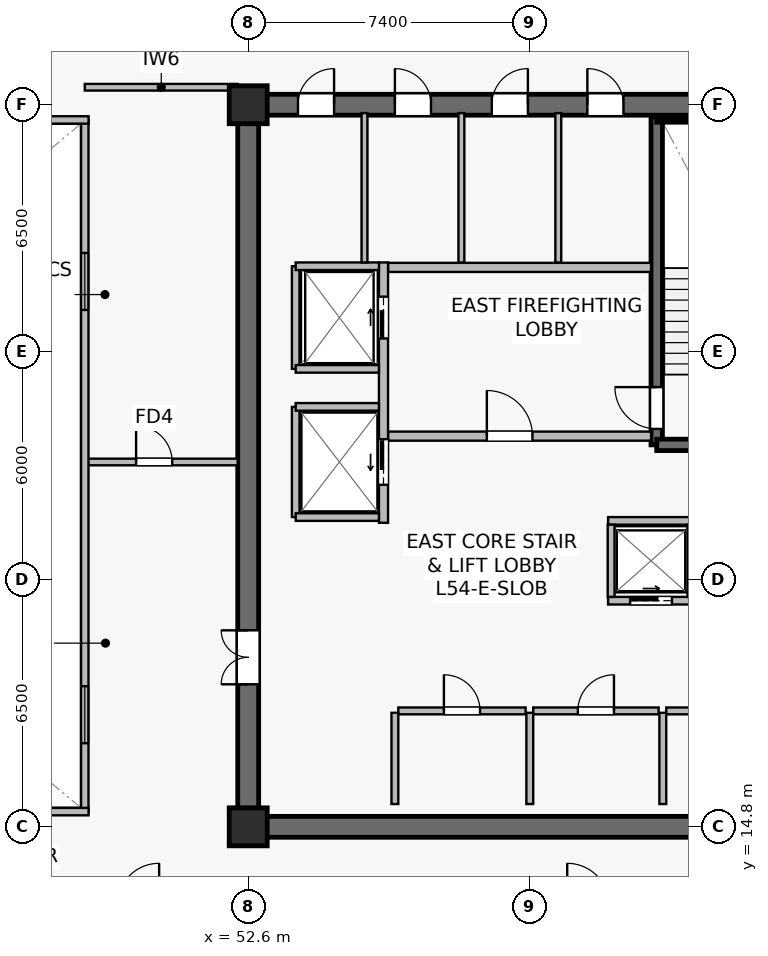
"""IFC4 building model, lengths in metres.
Left out: names, types, materials, properties, quantities, classifications, styles, units other than length and angle.
Written with IfcOpenShell. Run it as: python <this file> out.ifc"""

import sys

from ifc_helpers import new_model, si_unit, direction, frame, frame_2d, origin, origin_2d, place, context, subcontext, project, spatial, rectangle, extrude, source, transform, mapped, element, fill, save


model = new_model("IFC4")
c1 = context("Model", 3, precision=1e-05, world=origin(), true_north=direction((0.0, 1.0)))
c2 = subcontext(c1, "Body", "Model", "MODEL_VIEW")
j1 = project(units=[si_unit("LENGTHUNIT", "METRE"), si_unit("PLANEANGLEUNIT", "RADIAN")], contexts=[c1])
p1 = place(None, origin())
s1 = spatial("IfcSite", under=j1, at=p1, CompositionType="ELEMENT")
p2 = place(p1, origin())
s2 = spatial("IfcBuilding", under=s1, at=p2, CompositionType="ELEMENT")
p3 = place(p2, frame((0.0, 0.0, 226.0)))
s3 = spatial("IfcBuildingStorey", under=s2, at=p3, CompositionType="ELEMENT", Elevation=226.0)
p4 = place(p3, frame((52.325, 14.8, 0.0), z_axis=(0.0, 0.0, 1.0), x_axis=(1.0, 0.0, 0.0)))
e1 = element("IfcWall", 1, at=p4, inside=s3, PredefinedType="SHEAR", context=c2, shape_type="SweptSolid", body=[
    extrude(rectangle(XDim=15.35, YDim=0.55, at=frame_2d((7.675, 0.0))), origin(), (0.0, 0.0, 1.0), 3.8),
])
p5 = place(p3, frame((52.325, 33.8, 0.0), z_axis=(0.0, 0.0, 1.0), x_axis=(1.0, 0.0, 0.0)))
e2 = element("IfcWall", 2, at=p5, inside=s3, PredefinedType="SHEAR", context=c2, shape_type="SweptSolid", body=[
    extrude(rectangle(XDim=15.35, YDim=0.55, at=frame_2d((7.675, 0.0))), origin(), (0.0, 0.0, 1.0), 3.8),
])
p6 = place(p5, frame((9.2, 0.0, 0.0)))
e3 = element("IfcOpeningElement", 3, at=p6, cuts=e2, PredefinedType="OPENING", context=c2, shape_type="SweptSolid", body=[
    extrude(rectangle(XDim=0.95, YDim=2.15, at=frame_2d((0.475, 1.075))), frame((0.0, 0.285, 0.0), z_axis=(0.0, -1.0, 0.0), x_axis=(1.0, 0.0, 0.0)), (0.0, 0.0, 1.0), 0.57),
])
p7 = place(p5, frame((6.685, 0.0, 0.0)))
e4 = element("IfcOpeningElement", 4, at=p7, cuts=e2, PredefinedType="OPENING", context=c2, shape_type="SweptSolid", body=[
    extrude(rectangle(XDim=0.95, YDim=2.15, at=frame_2d((0.475, 1.075))), frame((0.0, 0.285, 0.0), z_axis=(0.0, -1.0, 0.0), x_axis=(1.0, 0.0, 0.0)), (0.0, 0.0, 1.0), 0.57),
])
p8 = place(p5, frame((4.135, 0.0, 0.0)))
e5 = element("IfcOpeningElement", 5, at=p8, cuts=e2, PredefinedType="OPENING", context=c2, shape_type="SweptSolid", body=[
    extrude(rectangle(XDim=0.95, YDim=2.15, at=frame_2d((0.475, 1.075))), frame((0.0, 0.285, 0.0), z_axis=(0.0, -1.0, 0.0), x_axis=(1.0, 0.0, 0.0)), (0.0, 0.0, 1.0), 0.57),
])
p9 = place(p5, frame((1.585, 0.0, 0.0)))
e6 = element("IfcOpeningElement", 6, at=p9, cuts=e2, PredefinedType="OPENING", context=c2, shape_type="SweptSolid", body=[
    extrude(rectangle(XDim=0.95, YDim=2.15, at=frame_2d((0.475, 1.075))), frame((0.0, 0.285, 0.0), z_axis=(0.0, -1.0, 0.0), x_axis=(1.0, 0.0, 0.0)), (0.0, 0.0, 1.0), 0.57),
])
p10 = place(p3, frame((52.6, 15.075, 0.0), z_axis=(0.0, 0.0, 1.0), x_axis=(0.0, 1.0, 0.0)))
e7 = element("IfcWall", 7, at=p10, inside=s3, PredefinedType="SHEAR", context=c2, shape_type="SweptSolid", body=[
    extrude(rectangle(XDim=18.45, YDim=0.55, at=frame_2d((9.225, 0.0))), origin(), (0.0, 0.0, 1.0), 3.8),
])
p11 = place(p10, frame((3.475, 0.0, 0.0)))
e8 = element("IfcOpeningElement", 8, at=p11, cuts=e7, PredefinedType="OPENING", context=c2, shape_type="SweptSolid", body=[
    extrude(rectangle(XDim=1.42, YDim=2.2, at=frame_2d((0.71, 1.1))), frame((0.0, 0.285, 0.0), z_axis=(0.0, -1.0, 0.0), x_axis=(1.0, 0.0, 0.0)), (0.0, 0.0, 1.0), 0.57),
])
p12 = place(p3, frame((63.35, 24.85, 0.0), z_axis=(0.0, 0.0, 1.0), x_axis=(0.0, 1.0, 0.0)))
e9 = element("IfcWall", 9, at=p12, inside=s3, PredefinedType="SHEAR", context=c2, shape_type="SweptSolid", body=[
    extrude(rectangle(XDim=8.63, YDim=0.3, at=frame_2d((4.315, 0.0))), origin(), (0.0, 0.0, 1.0), 3.8),
])
p13 = place(p12, frame((0.42, 0.0, 0.0)))
e10 = element("IfcOpeningElement", 10, at=p13, cuts=e9, PredefinedType="OPENING", context=c2, shape_type="SweptSolid", body=[
    extrude(rectangle(XDim=1.1, YDim=2.15, at=frame_2d((0.55, 1.075))), frame((0.0, 0.16, 0.0), z_axis=(0.0, -1.0, 0.0), x_axis=(1.0, 0.0, 0.0)), (0.0, 0.0, 1.0), 0.32),
])
p14 = place(p3, frame((63.35, 24.85, 0.0), z_axis=(0.0, 0.0, 1.0), x_axis=(1.0, 0.0, 0.0)))
e11 = element("IfcWall", 11, at=p14, inside=s3, PredefinedType="SHEAR", context=c2, shape_type="SweptSolid", body=[
    extrude(rectangle(XDim=3.8, YDim=0.3, at=frame_2d((1.9, 0.0))), origin(), (0.0, 0.0, 1.0), 3.8),
])
p15 = place(p3, frame((63.35, 33.4, 0.0), z_axis=(0.0, 0.0, 1.0), x_axis=(1.0, 0.0, 0.0)))
e12 = element("IfcWall", 12, at=p15, inside=s3, PredefinedType="SOLIDWALL", context=c2, shape_type="SweptSolid", body=[
    extrude(rectangle(XDim=3.72, YDim=0.12, at=frame_2d((1.86, 0.0))), origin(), (0.0, 0.0, 1.0), 3.8),
])
m1 = source(origin(), c2, "Body", "SweptSolid", [
    extrude(rectangle(XDim=1.0, YDim=1.0, at=origin_2d()), origin(), (0.0, 0.0, 1.0), 4.1),
])
for number, where, z_axis, x_axis in (
    (13, (52.6, 14.8, 0.0), (0.0, 0.0, 1.0), (1.0, 0.0, 0.0)),
    (14, (52.6, 33.8, 0.0), (0.0, 0.0, 1.0), (1.0, 0.0, 0.0)),
):
    element("IfcColumn", number, at=place(p3, frame(where, z_axis=z_axis, x_axis=x_axis)), inside=s3, PredefinedType="COLUMN", context=c2, shape_type="MappedRepresentation", body=[
        mapped(m1, transform((0.0, 0.0, 0.0), scale=1.0)),
    ])
p16 = place(p3, frame((56.28, 25.08, 0.0), z_axis=(0.0, 0.0, 1.0), x_axis=(1.0, 0.0, 0.0)))
e15 = element("IfcWall", 15, at=p16, inside=s3, PredefinedType="SOLIDWALL", context=c2, shape_type="SweptSolid", body=[
    extrude(rectangle(XDim=6.92, YDim=0.24, at=frame_2d((3.46, 0.0))), origin(), (0.0, 0.0, 1.0), 3.197),
])
p17 = place(p16, frame((2.6, 0.0, 0.0)))
e16 = element("IfcOpeningElement", 16, at=p17, cuts=e15, PredefinedType="OPENING", context=c2, shape_type="SweptSolid", body=[
    extrude(rectangle(XDim=1.2, YDim=2.16, at=frame_2d((0.6, 1.08))), frame((0.0, 0.13, 0.0), z_axis=(0.0, -1.0, 0.0), x_axis=(1.0, 0.0, 0.0)), (0.0, 0.0, 1.0), 0.26),
])
p18 = place(p3, frame((56.28, 29.52, 0.0), z_axis=(0.0, 0.0, 1.0), x_axis=(1.0, 0.0, 0.0)))
e17 = element("IfcWall", 17, at=p18, inside=s3, PredefinedType="SOLIDWALL", context=c2, shape_type="SweptSolid", body=[
    extrude(rectangle(XDim=6.92, YDim=0.24, at=frame_2d((3.46, 0.0))), origin(), (0.0, 0.0, 1.0), 3.197),
])
p19 = place(p3, frame((56.16, 22.8, 0.0), z_axis=(0.0, 0.0, 1.0), x_axis=(0.0, 1.0, 0.0)))
e18 = element("IfcWall", 18, at=p19, inside=s3, PredefinedType="SOLIDWALL", context=c2, shape_type="SweptSolid", body=[
    extrude(rectangle(XDim=6.85, YDim=0.24, at=frame_2d((3.425, 0.0))), origin(), (0.0, 0.0, 1.0), 2.935),
])
p20 = place(p19, frame((4.85, 0.0, 0.0)))
e19 = element("IfcOpeningElement", 19, at=p20, cuts=e18, PredefinedType="OPENING", context=c2, shape_type="SweptSolid", body=[
    extrude(rectangle(XDim=1.1, YDim=2.22, at=frame_2d((0.55, 1.11))), frame((0.0, 0.13, 0.0), z_axis=(0.0, -1.0, 0.0), x_axis=(1.0, 0.0, 0.0)), (0.0, 0.0, 1.0), 0.26),
])
p21 = place(p19, frame((1.0, 0.0, 0.0)))
e20 = element("IfcOpeningElement", 20, at=p21, cuts=e18, PredefinedType="OPENING", context=c2, shape_type="SweptSolid", body=[
    extrude(rectangle(XDim=1.2, YDim=2.22, at=frame_2d((0.6, 1.11))), frame((0.0, 0.13, 0.0), z_axis=(0.0, -1.0, 0.0), x_axis=(1.0, 0.0, 0.0)), (0.0, 0.0, 1.0), 0.26),
])
p22 = place(p3, frame((62.07, 20.75, 0.0), z_axis=(0.0, 0.0, 1.0), x_axis=(1.0, 0.0, 0.0)))
e21 = element("IfcWall", 21, at=p22, inside=s3, PredefinedType="SOLIDWALL", context=c2, shape_type="SweptSolid", body=[
    extrude(rectangle(XDim=2.26, YDim=0.2, at=frame_2d((1.13, 0.0))), origin(), (0.0, 0.0, 1.0), 3.8),
])
p23 = place(p22, frame((0.58, 0.0, 0.0)))
e22 = element("IfcOpeningElement", 22, at=p23, cuts=e21, PredefinedType="OPENING", context=c2, shape_type="SweptSolid", body=[
    extrude(rectangle(XDim=1.1, YDim=2.22, at=frame_2d((0.55, 1.11))), frame((0.0, 0.11, 0.0), z_axis=(0.0, -1.0, 0.0), x_axis=(1.0, 0.0, 0.0)), (0.0, 0.0, 1.0), 0.22),
])
p24 = place(p3, frame((62.07, 22.85, 0.0), z_axis=(0.0, 0.0, 1.0), x_axis=(1.0, 0.0, 0.0)))
e23 = element("IfcWall", 23, at=p24, inside=s3, PredefinedType="SOLIDWALL", context=c2, shape_type="SweptSolid", body=[
    extrude(rectangle(XDim=2.26, YDim=0.2, at=frame_2d((1.13, 0.0))), origin(), (0.0, 0.0, 1.0), 3.8),
])
for number, where, z_axis, x_axis in (
    (24, (62.15, 20.85, 0.0), (0.0, 0.0, 1.0), (0.0, 1.0, 0.0)),
    (25, (64.25, 20.85, 0.0), (0.0, 0.0, 1.0), (0.0, 1.0, 0.0)),
):
    element("IfcWall", number, at=place(p3, frame(where, z_axis=z_axis, x_axis=x_axis)), inside=s3, PredefinedType="SOLIDWALL", context=c2, shape_type="SweptSolid", body=[
        extrude(rectangle(XDim=1.9, YDim=0.18, at=frame_2d((0.95, 0.0))), origin(), (0.0, 0.0, 1.0), 3.8),
    ])
p25 = place(p3, frame((53.85, 26.85, 0.0), z_axis=(0.0, 0.0, 1.0), x_axis=(0.0, 1.0, 0.0)))
e26 = element("IfcWall", 26, at=p25, inside=s3, PredefinedType="SOLIDWALL", context=c2, shape_type="SweptSolid", body=[
    extrude(rectangle(XDim=2.7, YDim=0.2, at=frame_2d((1.35, 0.0))), origin(), (0.0, 0.0, 1.0), 3.8),
])
p26 = place(p3, frame((53.85, 29.55, 0.0), z_axis=(0.0, 0.0, 1.0), x_axis=(1.0, 0.0, 0.0)))
e27 = element("IfcWall", 27, at=p26, inside=s3, PredefinedType="SOLIDWALL", context=c2, shape_type="SweptSolid", body=[
    extrude(rectangle(XDim=2.19, YDim=0.2, at=frame_2d((1.095, 0.0))), origin(), (0.0, 0.0, 1.0), 3.8),
])
p27 = place(p3, frame((53.85, 26.85, 0.0), z_axis=(0.0, 0.0, 1.0), x_axis=(1.0, 0.0, 0.0)))
e28 = element("IfcWall", 28, at=p27, inside=s3, PredefinedType="SOLIDWALL", context=c2, shape_type="SweptSolid", body=[
    extrude(rectangle(XDim=2.19, YDim=0.2, at=frame_2d((1.095, 0.0))), origin(), (0.0, 0.0, 1.0), 3.197),
])
p28 = place(p3, frame((53.85, 22.95, 0.0), z_axis=(0.0, 0.0, 1.0), x_axis=(0.0, 1.0, 0.0)))
e29 = element("IfcWall", 29, at=p28, inside=s3, PredefinedType="SOLIDWALL", context=c2, shape_type="SweptSolid", body=[
    extrude(rectangle(XDim=2.9, YDim=0.2, at=frame_2d((1.45, 0.0))), origin(), (0.0, 0.0, 1.0), 2.935),
])
for number, where, z_axis, x_axis in (
    (30, (53.85, 25.85, 0.0), (0.0, 0.0, 1.0), (1.0, 0.0, 0.0)),
    (31, (53.85, 22.95, 0.0), (0.0, 0.0, 1.0), (1.0, 0.0, 0.0)),
):
    element("IfcWall", number, at=place(p3, frame(where, z_axis=z_axis, x_axis=x_axis)), inside=s3, PredefinedType="SOLIDWALL", context=c2, shape_type="SweptSolid", body=[
        extrude(rectangle(XDim=2.19, YDim=0.2, at=frame_2d((1.095, 0.0))), origin(), (0.0, 0.0, 1.0), 3.8),
    ])
p29 = place(p3, frame((63.6, 17.85, 0.0), z_axis=(0.0, 0.0, 1.0), x_axis=(1.0, 0.0, 0.0)))
e32 = element("IfcWall", 32, at=p29, inside=s3, PredefinedType="SOLIDWALL", context=c2, shape_type="SweptSolid", body=[
    extrude(rectangle(XDim=3.25, YDim=0.18, at=frame_2d((1.625, 0.0))), origin(), (0.0, 0.0, 1.0), 3.8),
])
p30 = place(p29, frame((1.15, 0.0, 0.0)))
e33 = element("IfcOpeningElement", 33, at=p30, cuts=e32, PredefinedType="OPENING", context=c2, shape_type="SweptSolid", body=[
    extrude(rectangle(XDim=0.95, YDim=2.15, at=frame_2d((0.475, 1.075))), frame((0.0, 0.1, 0.0), z_axis=(0.0, -1.0, 0.0), x_axis=(1.0, 0.0, 0.0)), (0.0, 0.0, 1.0), 0.2),
])
p31 = place(p3, frame((63.51, 15.4, 0.0), z_axis=(0.0, 0.0, 1.0), x_axis=(0.0, 1.0, 0.0)))
e34 = element("IfcWall", 34, at=p31, inside=s3, PredefinedType="SOLIDWALL", context=c2, shape_type="SweptSolid", body=[
    extrude(rectangle(XDim=2.4, YDim=0.18, at=frame_2d((1.2, 0.0))), origin(), (0.0, 0.0, 1.0), 3.8),
])
p32 = place(p3, frame((60.1, 17.85, 0.0), z_axis=(0.0, 0.0, 1.0), x_axis=(1.0, 0.0, 0.0)))
e35 = element("IfcWall", 35, at=p32, inside=s3, PredefinedType="SOLIDWALL", context=c2, shape_type="SweptSolid", body=[
    extrude(rectangle(XDim=3.3, YDim=0.18, at=frame_2d((1.65, 0.0))), origin(), (0.0, 0.0, 1.0), 3.197),
])
p33 = place(p32, frame((1.175, 0.0, 0.0)))
e36 = element("IfcOpeningElement", 36, at=p33, cuts=e35, PredefinedType="OPENING", context=c2, shape_type="SweptSolid", body=[
    extrude(rectangle(XDim=0.95, YDim=2.15, at=frame_2d((0.475, 1.075))), frame((0.0, 0.1, 0.0), z_axis=(0.0, -1.0, 0.0), x_axis=(1.0, 0.0, 0.0)), (0.0, 0.0, 1.0), 0.2),
])
p34 = place(p3, frame((60.01, 15.4, 0.0), z_axis=(0.0, 0.0, 1.0), x_axis=(0.0, 1.0, 0.0)))
e37 = element("IfcWall", 37, at=p34, inside=s3, PredefinedType="SOLIDWALL", context=c2, shape_type="SweptSolid", body=[
    extrude(rectangle(XDim=2.4, YDim=0.18, at=frame_2d((1.2, 0.0))), origin(), (0.0, 0.0, 1.0), 3.197),
])
p35 = place(p3, frame((56.55, 17.85, 0.0), z_axis=(0.0, 0.0, 1.0), x_axis=(1.0, 0.0, 0.0)))
e38 = element("IfcWall", 38, at=p35, inside=s3, PredefinedType="SOLIDWALL", context=c2, shape_type="SweptSolid", body=[
    extrude(rectangle(XDim=3.35, YDim=0.18, at=frame_2d((1.675, 0.0))), origin(), (0.0, 0.0, 1.0), 3.197),
])
p36 = place(p35, frame((1.2, 0.0, 0.0)))
e39 = element("IfcOpeningElement", 39, at=p36, cuts=e38, PredefinedType="OPENING", context=c2, shape_type="SweptSolid", body=[
    extrude(rectangle(XDim=0.95, YDim=2.15, at=frame_2d((0.475, 1.075))), frame((0.0, 0.1, 0.0), z_axis=(0.0, -1.0, 0.0), x_axis=(1.0, 0.0, 0.0)), (0.0, 0.0, 1.0), 0.2),
])
p37 = place(p3, frame((56.46, 15.4, 0.0), z_axis=(0.0, 0.0, 1.0), x_axis=(0.0, 1.0, 0.0)))
e40 = element("IfcWall", 40, at=p37, inside=s3, PredefinedType="SOLIDWALL", context=c2, shape_type="SweptSolid", body=[
    extrude(rectangle(XDim=2.4, YDim=0.18, at=frame_2d((1.2, 0.0))), origin(), (0.0, 0.0, 1.0), 3.8),
])
for number, where, z_axis, x_axis in (
    (41, (60.76, 29.65, 0.0), (0.0, 0.0, 1.0), (0.0, 1.0, 0.0)),
    (42, (58.21, 29.65, 0.0), (0.0, 0.0, 1.0), (0.0, 1.0, 0.0)),
    (43, (55.66, 29.65, 0.0), (0.0, 0.0, 1.0), (0.0, 1.0, 0.0)),
):
    element("IfcWall", number, at=place(p3, frame(where, z_axis=z_axis, x_axis=x_axis)), inside=s3, PredefinedType="PLUMBINGWALL", context=c2, shape_type="SweptSolid", body=[
        extrude(rectangle(XDim=3.93, YDim=0.155, at=frame_2d((1.965, 0.0))), origin(), (0.0, 0.0, 1.0), 3.8),
    ])
p38 = place(p3, frame((48.3, 34.26, 0.0), z_axis=(0.0, 0.0, 1.0), x_axis=(1.0, 0.0, 0.0)))
e44 = element("IfcWall", 44, at=p38, inside=s3, PredefinedType="PARTITIONING", context=c2, shape_type="SweptSolid", body=[
    extrude(rectangle(XDim=4.025, YDim=0.175, at=frame_2d((2.012, 0.0))), origin(), (0.0, 0.0, 1.0), 3.485),
])
p39 = place(p3, frame((48.3, 24.4, 0.0), z_axis=(0.0, 0.0, 1.0), x_axis=(1.0, 0.0, 0.0)))
e45 = element("IfcWall", 45, at=p39, inside=s3, PredefinedType="PARTITIONING", context=c2, shape_type="SweptSolid", body=[
    extrude(rectangle(XDim=4.025, YDim=0.175, at=frame_2d((2.012, 0.0))), origin(), (0.0, 0.0, 1.0), 3.8),
])
p40 = place(p39, frame((1.35, 0.0, 0.0)))
e46 = element("IfcOpeningElement", 46, at=p40, cuts=e45, PredefinedType="OPENING", context=c2, shape_type="SweptSolid", body=[
    extrude(rectangle(XDim=0.95, YDim=2.15, at=frame_2d((0.475, 1.075))), frame((0.0, 0.098, 0.0), z_axis=(0.0, -1.0, 0.0), x_axis=(1.0, 0.0, 0.0)), (0.0, 0.0, 1.0), 0.195),
])
p41 = place(p3, frame((48.3, 15.2, 0.0), z_axis=(0.0, 0.0, 1.0), x_axis=(0.0, 1.0, 0.0)))
e47 = element("IfcWall", 47, at=p41, inside=s3, PredefinedType="SOLIDWALL", context=c2, shape_type="SweptSolid", body=[
    extrude(rectangle(XDim=18.2, YDim=0.195, at=frame_2d((9.1, 0.0))), origin(), (0.0, 0.0, 1.0), 3.8),
])
p42 = place(p41, frame((1.8, 0.0, 0.9)))
e48 = element("IfcOpeningElement", 48, at=p42, cuts=e47, PredefinedType="OPENING", context=c2, shape_type="SweptSolid", body=[
    extrude(rectangle(XDim=1.5, YDim=1.4, at=frame_2d((0.75, 0.7))), frame((0.0, 0.107, 0.0), z_axis=(0.0, -1.0, 0.0), x_axis=(1.0, 0.0, 0.0)), (0.0, 0.0, 1.0), 0.215),
])
p43 = place(p41, frame((13.2, 0.0, 0.9)))
e49 = element("IfcOpeningElement", 49, at=p43, cuts=e47, PredefinedType="OPENING", context=c2, shape_type="SweptSolid", body=[
    extrude(rectangle(XDim=1.5, YDim=1.4, at=frame_2d((0.75, 0.7))), frame((0.0, 0.107, 0.0), z_axis=(0.0, -1.0, 0.0), x_axis=(1.0, 0.0, 0.0)), (0.0, 0.0, 1.0), 0.215),
])
for number, where, z_axis, x_axis in (
    (50, (26.4, 15.2, 0.0), (0.0, 0.0, 1.0), (1.0, 0.0, 0.0)),
    (51, (26.4, 33.4, 0.0), (0.0, 0.0, 1.0), (1.0, 0.0, 0.0)),
):
    element("IfcWall", number, at=place(p3, frame(where, z_axis=z_axis, x_axis=x_axis)), inside=s3, PredefinedType="SOLIDWALL", context=c2, shape_type="SweptSolid", body=[
        extrude(rectangle(XDim=22.0, YDim=0.195, at=frame_2d((11.0, 0.0))), origin(), (0.0, 0.0, 1.0), 3.8),
    ])
m2 = source(origin(), c2, "Body", "SweptSolid", [
    extrude(rectangle(XDim=1.5, YDim=1.4, at=frame_2d((0.75, 0.7))), frame((0.0, 0.03, 0.0), z_axis=(0.0, -1.0, 0.0), x_axis=(1.0, 0.0, 0.0)), (0.0, 0.0, 1.0), 0.06),
])
p44 = place(p42, origin())
e52 = element("IfcWindow", 52, at=p44, inside=s3, PartitioningType="SINGLE_PANEL", PredefinedType="WINDOW", context=c2, shape_type="MappedRepresentation", body=[
    mapped(m2, transform((0.0, 0.0, 0.0), scale=1.0)),
])
fill(e48, e52)
p45 = place(p43, origin())
e53 = element("IfcWindow", 53, at=p45, inside=s3, PartitioningType="SINGLE_PANEL", PredefinedType="WINDOW", context=c2, shape_type="MappedRepresentation", body=[
    mapped(m2, transform((0.0, 0.0, 0.0), scale=1.0)),
])
fill(e49, e53)
m3 = source(origin(), c2, "Body", "SweptSolid", [
    extrude(rectangle(XDim=1.1, YDim=2.15, at=frame_2d((0.55, 1.075))), frame((0.0, 0.025, 0.0), z_axis=(0.0, -1.0, 0.0), x_axis=(1.0, 0.0, 0.0)), (0.0, 0.0, 1.0), 0.05),
])
p46 = place(p13, origin())
e54 = element("IfcDoor", 54, at=p46, inside=s3, OperationType="SINGLE_SWING_RIGHT", PredefinedType="DOOR", context=c2, shape_type="MappedRepresentation", body=[
    mapped(m3, transform((0.0, 0.0, 0.0), scale=1.0)),
])
fill(e10, e54)
m4 = source(origin(), c2, "Body", "SweptSolid", [
    extrude(rectangle(XDim=1.2, YDim=2.16, at=frame_2d((0.6, 1.08))), frame((0.0, 0.025, 0.0), z_axis=(0.0, -1.0, 0.0), x_axis=(1.0, 0.0, 0.0)), (0.0, 0.0, 1.0), 0.05),
])
p47 = place(p17, origin())
e55 = element("IfcDoor", 55, at=p47, inside=s3, OperationType="SINGLE_SWING_LEFT", PredefinedType="DOOR", context=c2, shape_type="MappedRepresentation", body=[
    mapped(m4, transform((0.0, 0.0, 0.0), scale=1.0)),
])
fill(e16, e55)
m5 = source(origin(), c2, "Body", "SweptSolid", [
    extrude(rectangle(XDim=1.1, YDim=2.22, at=frame_2d((0.55, 1.11))), frame((0.0, 0.025, 0.0), z_axis=(0.0, -1.0, 0.0), x_axis=(1.0, 0.0, 0.0)), (0.0, 0.0, 1.0), 0.05),
])
p48 = place(p23, origin())
e56 = element("IfcDoor", 56, at=p48, inside=s3, OperationType="SLIDING_TO_RIGHT", PredefinedType="USERDEFINED", context=c2, shape_type="MappedRepresentation", body=[
    mapped(m5, transform((0.0, 0.0, 0.0), scale=1.0)),
])
fill(e22, e56)
p49 = place(p20, origin())
e57 = element("IfcDoor", 57, at=p49, inside=s3, OperationType="SLIDING_TO_RIGHT", PredefinedType="USERDEFINED", context=c2, shape_type="MappedRepresentation", body=[
    mapped(m5, transform((0.0, 0.0, 0.0), scale=1.0)),
])
fill(e19, e57)
m6 = source(origin(), c2, "Body", "SweptSolid", [
    extrude(rectangle(XDim=1.2, YDim=2.22, at=frame_2d((0.6, 1.11))), frame((0.0, 0.025, 0.0), z_axis=(0.0, -1.0, 0.0), x_axis=(1.0, 0.0, 0.0)), (0.0, 0.0, 1.0), 0.05),
])
p50 = place(p21, origin())
e58 = element("IfcDoor", 58, at=p50, inside=s3, OperationType="SLIDING_TO_LEFT", PredefinedType="USERDEFINED", context=c2, shape_type="MappedRepresentation", body=[
    mapped(m6, transform((0.0, 0.0, 0.0), scale=1.0)),
])
fill(e20, e58)
m7 = source(origin(), c2, "Body", "SweptSolid", [
    extrude(rectangle(XDim=0.95, YDim=2.15, at=frame_2d((0.475, 1.075))), frame((0.0, 0.025, 0.0), z_axis=(0.0, -1.0, 0.0), x_axis=(1.0, 0.0, 0.0)), (0.0, 0.0, 1.0), 0.05),
])
p51 = place(p33, origin())
e59 = element("IfcDoor", 59, at=p51, inside=s3, OperationType="SINGLE_SWING_RIGHT", PredefinedType="DOOR", context=c2, shape_type="MappedRepresentation", body=[
    mapped(m7, transform((0.0, 0.0, 0.0), scale=1.0)),
])
fill(e36, e59)
p52 = place(p36, origin())
e60 = element("IfcDoor", 60, at=p52, inside=s3, OperationType="SINGLE_SWING_LEFT", PredefinedType="DOOR", context=c2, shape_type="MappedRepresentation", body=[
    mapped(m7, transform((0.0, 0.0, 0.0), scale=1.0)),
])
fill(e39, e60)
m8 = source(origin(), c2, "Body", "SweptSolid", [
    extrude(rectangle(XDim=1.42, YDim=2.2, at=frame_2d((0.71, 1.1))), frame((0.0, 0.025, 0.0), z_axis=(0.0, -1.0, 0.0), x_axis=(1.0, 0.0, 0.0)), (0.0, 0.0, 1.0), 0.05),
])
p53 = place(p11, origin())
e61 = element("IfcDoor", 61, at=p53, inside=s3, OperationType="DOUBLE_DOOR_SINGLE_SWING", PredefinedType="DOOR", context=c2, shape_type="MappedRepresentation", body=[
    mapped(m8, transform((0.0, 0.0, 0.0), scale=1.0)),
])
fill(e8, e61)
p54 = place(p6, origin())
e62 = element("IfcDoor", 62, at=p54, inside=s3, OperationType="SINGLE_SWING_LEFT", PredefinedType="DOOR", context=c2, shape_type="MappedRepresentation", body=[
    mapped(m7, transform((0.0, 0.0, 0.0), scale=1.0)),
])
fill(e3, e62)
p55 = place(p7, origin())
e63 = element("IfcDoor", 63, at=p55, inside=s3, OperationType="SINGLE_SWING_RIGHT", PredefinedType="DOOR", context=c2, shape_type="MappedRepresentation", body=[
    mapped(m7, transform((0.0, 0.0, 0.0), scale=1.0)),
])
fill(e4, e63)
p56 = place(p8, origin())
e64 = element("IfcDoor", 64, at=p56, inside=s3, OperationType="SINGLE_SWING_LEFT", PredefinedType="DOOR", context=c2, shape_type="MappedRepresentation", body=[
    mapped(m7, transform((0.0, 0.0, 0.0), scale=1.0)),
])
fill(e5, e64)
p57 = place(p9, origin())
e65 = element("IfcDoor", 65, at=p57, inside=s3, OperationType="SINGLE_SWING_RIGHT", PredefinedType="DOOR", context=c2, shape_type="MappedRepresentation", body=[
    mapped(m7, transform((0.0, 0.0, 0.0), scale=1.0)),
])
fill(e6, e65)
p58 = place(p40, origin())
e66 = element("IfcDoor", 66, at=p58, inside=s3, OperationType="SINGLE_SWING_LEFT", PredefinedType="DOOR", context=c2, shape_type="MappedRepresentation", body=[
    mapped(m7, transform((0.0, 0.0, 0.0), scale=1.0)),
])
fill(e46, e66)
save(model, sys.argv[1])
